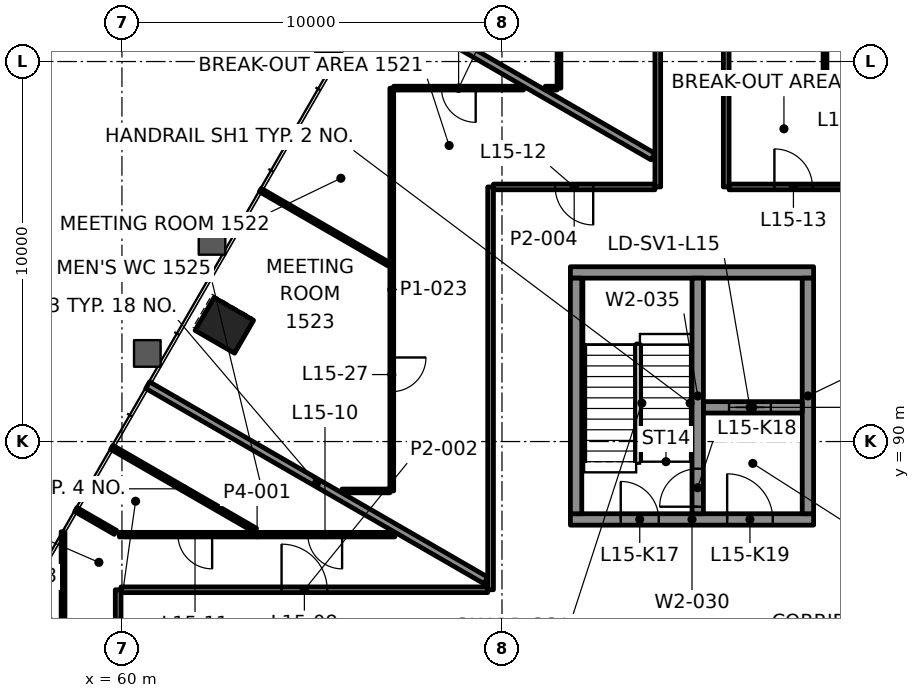
"""IFC4 building model, lengths in metres.
Left out: names, types, materials, properties, quantities, classifications, styles, units other than length and angle.
Written with IfcOpenShell. Run it as: python <this file> out.ifc"""

import sys

from ifc_helpers import new_model, si_unit, direction, frame, frame_2d, origin, origin_2d, place, context, subcontext, project, spatial, rectangle, extrude, element, fill, save


model = new_model("IFC4")
c1 = context("Model", 3, precision=1e-05, world=origin(), true_north=direction((0.0, 1.0)))
c2 = subcontext(c1, "Body", "Model", "MODEL_VIEW")
j1 = project(units=[si_unit("LENGTHUNIT", "METRE"), si_unit("PLANEANGLEUNIT", "RADIAN")], contexts=[c1])
p1 = place(None, origin())
s1 = spatial("IfcSite", under=j1, at=p1, CompositionType="ELEMENT")
p2 = place(p1, origin())
s2 = spatial("IfcBuilding", under=s1, at=p2, CompositionType="ELEMENT")
p3 = place(p2, frame((0.0, 0.0, 69.4)))
s3 = spatial("IfcBuildingStorey", under=s2, at=p3, CompositionType="ELEMENT", Elevation=69.4)
for number, where, z_axis, x_axis in (
    (1, (62.694, 93.057, -0.0), (0.0, 0.0, 1.0), (-0.5, -0.866, 0.0)),
    (2, (57.951, 84.843, -0.0), (0.0, 0.0, 1.0), (-0.5, -0.866, 0.0)),
):
    element("IfcColumn", number, at=place(p3, frame(where, z_axis=z_axis, x_axis=x_axis)), inside=s3, PredefinedType="COLUMN", context=c2, shape_type="SweptSolid", body=[
        extrude(rectangle(XDim=1.0, YDim=1.2, at=origin_2d()), origin(), (0.0, 0.0, 1.0), 4.2),
    ])
p4 = place(p3, frame((71.8, 87.95, 0.0), z_axis=(0.0, 0.0, 1.0), x_axis=(1.0, 0.0, 0.0)))
e3 = element("IfcWall", 3, at=p4, inside=s3, PredefinedType="SHEAR", context=c2, shape_type="SweptSolid", body=[
    extrude(rectangle(XDim=6.4, YDim=0.3, at=frame_2d((3.2, 0.0))), origin(), (0.0, 0.0, 1.0), 4.0),
])
p5 = place(p4, frame((1.325, 0.0, 0.0)))
e4 = element("IfcOpeningElement", 4, at=p5, cuts=e3, PredefinedType="OPENING", context=c2, shape_type="SweptSolid", body=[
    extrude(rectangle(XDim=1.0, YDim=2.1, at=frame_2d((0.5, 1.05))), frame((0.0, 0.16, 0.0), z_axis=(0.0, -1.0, 0.0), x_axis=(1.0, 0.0, 0.0)), (0.0, 0.0, 1.0), 0.32),
])
p6 = place(p4, frame((4.125, 0.0, 0.0)))
e5 = element("IfcOpeningElement", 5, at=p6, cuts=e3, PredefinedType="OPENING", context=c2, shape_type="SweptSolid", body=[
    extrude(rectangle(XDim=1.2, YDim=2.1, at=frame_2d((0.6, 1.05))), frame((0.0, 0.16, 0.0), z_axis=(0.0, -1.0, 0.0), x_axis=(1.0, 0.0, 0.0)), (0.0, 0.0, 1.0), 0.32),
])
p7 = place(p3, frame((71.8, 94.45, 0.0), z_axis=(0.0, 0.0, 1.0), x_axis=(1.0, 0.0, 0.0)))
e6 = element("IfcWall", 6, at=p7, inside=s3, PredefinedType="SHEAR", context=c2, shape_type="SweptSolid", body=[
    extrude(rectangle(XDim=6.4, YDim=0.3, at=frame_2d((3.2, 0.0))), origin(), (0.0, 0.0, 1.0), 4.0),
])
for number, where, z_axis, x_axis in (
    (7, (71.95, 88.1, 0.0), (0.0, 0.0, 1.0), (0.0, 1.0, 0.0)),
    (8, (78.05, 88.1, 0.0), (0.0, 0.0, 1.0), (0.0, 1.0, 0.0)),
):
    element("IfcWall", number, at=place(p3, frame(where, z_axis=z_axis, x_axis=x_axis)), inside=s3, PredefinedType="SHEAR", context=c2, shape_type="SweptSolid", body=[
        extrude(rectangle(XDim=6.2, YDim=0.3, at=frame_2d((3.1, 0.0))), origin(), (0.0, 0.0, 1.0), 4.0),
    ])
p8 = place(p3, frame((75.3, 90.9, 0.0), z_axis=(0.0, 0.0, 1.0), x_axis=(1.0, 0.0, 0.0)))
e9 = element("IfcWall", 9, at=p8, inside=s3, PredefinedType="SHEAR", context=c2, shape_type="SweptSolid", body=[
    extrude(rectangle(XDim=2.6, YDim=0.3, at=frame_2d((1.3, 0.0))), origin(), (0.0, 0.0, 1.0), 4.0),
])
p9 = place(p8, frame((0.675, 0.0, 0.0)))
e10 = element("IfcOpeningElement", 10, at=p9, cuts=e9, PredefinedType="OPENING", context=c2, shape_type="SweptSolid", body=[
    extrude(rectangle(XDim=1.1, YDim=2.1, at=frame_2d((0.55, 1.05))), frame((0.0, 0.16, 0.0), z_axis=(0.0, -1.0, 0.0), x_axis=(1.0, 0.0, 0.0)), (0.0, 0.0, 1.0), 0.32),
])
p10 = place(p3, frame((75.15, 88.1, 0.0), z_axis=(0.0, 0.0, 1.0), x_axis=(0.0, 1.0, 0.0)))
e11 = element("IfcWall", 11, at=p10, inside=s3, PredefinedType="SHEAR", context=c2, shape_type="SweptSolid", body=[
    extrude(rectangle(XDim=6.2, YDim=0.3, at=frame_2d((3.1, 0.0))), origin(), (0.0, 0.0, 1.0), 4.0),
])
p11 = place(p10, frame((0.185, 0.0, 0.0)))
e12 = element("IfcOpeningElement", 12, at=p11, cuts=e11, PredefinedType="OPENING", context=c2, shape_type="SweptSolid", body=[
    extrude(rectangle(XDim=1.0, YDim=2.1, at=frame_2d((0.5, 1.05))), frame((0.0, 0.16, 0.0), z_axis=(0.0, -1.0, 0.0), x_axis=(1.0, 0.0, 0.0)), (0.0, 0.0, 1.0), 0.32),
])
p12 = place(p3, frame((59.976, 86.1, 0.0), z_axis=(0.0, 0.0, 1.0), x_axis=(1.0, 0.0, 0.0)))
e13 = element("IfcWall", 13, at=p12, inside=s3, PredefinedType="PARTITIONING", context=c2, shape_type="SweptSolid", body=[
    extrude(rectangle(XDim=9.649, YDim=0.15, at=frame_2d((4.825, 0.0))), origin(), (0.0, 0.0, 1.0), 3.4),
])
p13 = place(p12, frame((4.225, 0.0, 0.0)))
e14 = element("IfcOpeningElement", 14, at=p13, cuts=e13, PredefinedType="OPENING", context=c2, shape_type="SweptSolid", body=[
    extrude(rectangle(XDim=1.2, YDim=2.1, at=frame_2d((0.6, 1.05))), frame((0.0, 0.085, 0.0), z_axis=(0.0, -1.0, 0.0), x_axis=(1.0, 0.0, 0.0)), (0.0, 0.0, 1.0), 0.17),
])
p14 = place(p3, frame((67.181, 87.55, 0.0), z_axis=(0.0, 0.0, 1.0), x_axis=(-1.0, 0.0, 0.0)))
e15 = element("IfcWall", 15, at=p14, inside=s3, PredefinedType="PARTITIONING", context=c2, shape_type="SweptSolid", body=[
    extrude(rectangle(XDim=7.249, YDim=0.12, at=frame_2d((3.625, 0.0))), origin(), (0.0, 0.0, 1.0), 3.4),
])
p15 = place(p14, frame((1.388, 0.0, 0.0)))
e16 = element("IfcOpeningElement", 16, at=p15, cuts=e15, PredefinedType="OPENING", context=c2, shape_type="SweptSolid", body=[
    extrude(rectangle(XDim=0.9, YDim=2.1, at=frame_2d((0.45, 1.05))), frame((0.0, 0.07, 0.0), z_axis=(0.0, -1.0, 0.0), x_axis=(1.0, 0.0, 0.0)), (0.0, 0.0, 1.0), 0.14),
])
p16 = place(p14, frame((4.807, 0.0, 0.0)))
e17 = element("IfcOpeningElement", 17, at=p16, cuts=e15, PredefinedType="OPENING", context=c2, shape_type="SweptSolid", body=[
    extrude(rectangle(XDim=0.9, YDim=2.1, at=frame_2d((0.45, 1.05))), frame((0.0, 0.07, 0.0), z_axis=(0.0, -1.0, 0.0), x_axis=(1.0, 0.0, 0.0)), (0.0, 0.0, 1.0), 0.14),
])
p17 = place(p3, frame((65.789, 88.7, 0.0), z_axis=(0.0, 0.0, 1.0), x_axis=(1.0, 0.0, 0.0)))
e18 = element("IfcWall", 18, at=p17, inside=s3, PredefinedType="PARTITIONING", context=c2, shape_type="SweptSolid", body=[
    extrude(rectangle(XDim=1.261, YDim=0.1, at=frame_2d((0.631, 0.0))), origin(), (0.0, 0.0, 1.0), 3.4),
])
p18 = place(p3, frame((74.025, 96.7, 0.0), z_axis=(0.0, 0.0, 1.0), x_axis=(-1.0, 0.0, 0.0)))
e19 = element("IfcWall", 19, at=p18, inside=s3, PredefinedType="PARTITIONING", context=c2, shape_type="SweptSolid", body=[
    extrude(rectangle(XDim=4.25, YDim=0.15, at=frame_2d((2.125, 0.0))), origin(), (0.0, 0.0, 1.0), 3.4),
])
p19 = place(p18, frame((1.625, 0.0, 0.0)))
e20 = element("IfcOpeningElement", 20, at=p19, cuts=e19, PredefinedType="OPENING", context=c2, shape_type="SweptSolid", body=[
    extrude(rectangle(XDim=1.0, YDim=2.1, at=frame_2d((0.5, 1.05))), frame((0.0, 0.085, 0.0), z_axis=(0.0, -1.0, 0.0), x_axis=(1.0, 0.0, 0.0)), (0.0, 0.0, 1.0), 0.17),
])
p20 = place(p3, frame((75.975, 96.7, 0.0), z_axis=(0.0, 0.0, 1.0), x_axis=(1.0, 0.0, 0.0)))
e21 = element("IfcWall", 21, at=p20, inside=s3, PredefinedType="PARTITIONING", context=c2, shape_type="SweptSolid", body=[
    extrude(rectangle(XDim=3.387, YDim=0.15, at=frame_2d((1.693, 0.0))), origin(), (0.0, 0.0, 1.0), 3.4),
])
p21 = place(p20, frame((1.194, 0.0, 0.0)))
e22 = element("IfcOpeningElement", 22, at=p21, cuts=e21, PredefinedType="OPENING", context=c2, shape_type="SweptSolid", body=[
    extrude(rectangle(XDim=1.0, YDim=2.1, at=frame_2d((0.5, 1.05))), frame((0.0, 0.085, 0.0), z_axis=(0.0, -1.0, 0.0), x_axis=(1.0, 0.0, 0.0)), (0.0, 0.0, 1.0), 0.17),
])
p22 = place(p3, frame((70.567, 99.3, 0.0), z_axis=(0.0, 0.0, 1.0), x_axis=(-1.0, 0.0, 0.0)))
e23 = element("IfcWall", 23, at=p22, inside=s3, PredefinedType="PARTITIONING", context=c2, shape_type="SweptSolid", body=[
    extrude(rectangle(XDim=3.417, YDim=0.1, at=frame_2d((1.708, 0.0))), origin(), (0.0, 0.0, 1.0), 3.4),
])
p23 = place(p22, frame((1.258, 0.0, 0.0)))
e24 = element("IfcOpeningElement", 24, at=p23, cuts=e23, PredefinedType="OPENING", context=c2, shape_type="SweptSolid", body=[
    extrude(rectangle(XDim=0.9, YDim=2.1, at=frame_2d((0.45, 1.05))), frame((0.0, 0.06, 0.0), z_axis=(0.0, -1.0, 0.0), x_axis=(1.0, 0.0, 0.0)), (0.0, 0.0, 1.0), 0.12),
])
p24 = place(p3, frame((78.55, 99.3, 0.0), z_axis=(0.0, 0.0, 1.0), x_axis=(1.0, 0.0, 0.0)))
e25 = element("IfcWall", 25, at=p24, inside=s3, PredefinedType="PARTITIONING", context=c2, shape_type="SweptSolid", body=[
    extrude(rectangle(XDim=4.349, YDim=0.1, at=frame_2d((2.175, 0.0))), origin(), (0.0, 0.0, 1.0), 3.4),
])
p25 = place(p24, frame((1.725, 0.0, 0.0)))
e26 = element("IfcOpeningElement", 26, at=p25, cuts=e25, PredefinedType="OPENING", context=c2, shape_type="SweptSolid", body=[
    extrude(rectangle(XDim=0.9, YDim=2.1, at=frame_2d((0.45, 1.05))), frame((0.0, 0.06, 0.0), z_axis=(0.0, -1.0, 0.0), x_axis=(1.0, 0.0, 0.0)), (0.0, 0.0, 1.0), 0.12),
])
p26 = place(p3, frame((78.5, 99.3, 0.0), z_axis=(0.0, 0.0, 1.0), x_axis=(0.0, 1.0, 0.0)))
e27 = element("IfcWall", 27, at=p26, inside=s3, PredefinedType="PARTITIONING", context=c2, shape_type="SweptSolid", body=[
    extrude(rectangle(XDim=9.736, YDim=0.1, at=frame_2d((4.868, 0.0))), origin(), (0.0, 0.0, 1.0), 3.4),
])
p27 = place(p26, frame((6.382, 0.0, 0.0)))
e28 = element("IfcOpeningElement", 28, at=p27, cuts=e27, PredefinedType="OPENING", context=c2, shape_type="SweptSolid", body=[
    extrude(rectangle(XDim=0.9, YDim=2.1, at=frame_2d((0.45, 1.05))), frame((0.0, 0.06, 0.0), z_axis=(0.0, -1.0, 0.0), x_axis=(1.0, 0.0, 0.0)), (0.0, 0.0, 1.0), 0.12),
])
p28 = place(p3, frame((75.9, 96.7, 0.0), z_axis=(0.0, 0.0, 1.0), x_axis=(0.0, 1.0, 0.0)))
e29 = element("IfcWall", 29, at=p28, inside=s3, PredefinedType="PARTITIONING", context=c2, shape_type="SweptSolid", body=[
    extrude(rectangle(XDim=9.737, YDim=0.15, at=frame_2d((4.868, 0.0))), origin(), (0.0, 0.0, 1.0), 3.4),
])
p29 = place(p3, frame((74.1, 96.7, 0.0), z_axis=(0.0, 0.0, 1.0), x_axis=(0.0, 1.0, 0.0)))
e30 = element("IfcWall", 30, at=p29, inside=s3, PredefinedType="PARTITIONING", context=c2, shape_type="SweptSolid", body=[
    extrude(rectangle(XDim=9.736, YDim=0.15, at=frame_2d((4.868, 0.0))), origin(), (0.0, 0.0, 1.0), 3.4),
])
p30 = place(p29, frame((4.629, 0.0, 0.0)))
e31 = element("IfcOpeningElement", 31, at=p30, cuts=e30, PredefinedType="OPENING", context=c2, shape_type="SweptSolid", body=[
    extrude(rectangle(XDim=1.0, YDim=2.1, at=frame_2d((0.5, 1.05))), frame((0.0, 0.085, 0.0), z_axis=(0.0, -1.0, 0.0), x_axis=(1.0, 0.0, 0.0)), (0.0, 0.0, 1.0), 0.17),
])
p31 = place(p3, frame((71.5, 104.801, 0.0), z_axis=(0.0, 0.0, 1.0), x_axis=(0.0, -1.0, 0.0)))
e32 = element("IfcWall", 32, at=p31, inside=s3, PredefinedType="PARTITIONING", context=c2, shape_type="SweptSolid", body=[
    extrude(rectangle(XDim=5.501, YDim=0.1, at=frame_2d((2.75, 0.0))), origin(), (0.0, 0.0, 1.0), 3.4),
])
p32 = place(p31, frame((2.301, 0.0, 0.0)))
e33 = element("IfcOpeningElement", 33, at=p32, cuts=e32, PredefinedType="OPENING", context=c2, shape_type="SweptSolid", body=[
    extrude(rectangle(XDim=0.9, YDim=2.1, at=frame_2d((0.45, 1.05))), frame((0.0, 0.06, 0.0), z_axis=(0.0, -1.0, 0.0), x_axis=(1.0, 0.0, 0.0)), (0.0, 0.0, 1.0), 0.12),
])
p33 = place(p3, frame((69.7, 86.1, 0.0), z_axis=(0.0, 0.0, 1.0), x_axis=(0.0, 1.0, 0.0)))
e34 = element("IfcWall", 34, at=p33, inside=s3, PredefinedType="PARTITIONING", context=c2, shape_type="SweptSolid", body=[
    extrude(rectangle(XDim=10.6, YDim=0.15, at=frame_2d((5.3, 0.0))), origin(), (0.0, 0.0, 1.0), 3.4),
])
p34 = place(p3, frame((67.1, 99.3, 0.0), z_axis=(0.0, 0.0, 1.0), x_axis=(0.0, -1.0, 0.0)))
e35 = element("IfcWall", 35, at=p34, inside=s3, PredefinedType="PARTITIONING", context=c2, shape_type="SweptSolid", body=[
    extrude(rectangle(XDim=10.6, YDim=0.1, at=frame_2d((5.3, 0.0))), origin(), (0.0, 0.0, 1.0), 3.4),
])
p35 = place(p34, frame((7.088, 0.0, 0.0)))
e36 = element("IfcOpeningElement", 36, at=p35, cuts=e35, PredefinedType="OPENING", context=c2, shape_type="SweptSolid", body=[
    extrude(rectangle(XDim=0.9, YDim=2.1, at=frame_2d((0.45, 1.05))), frame((0.0, 0.06, 0.0), z_axis=(0.0, -1.0, 0.0), x_axis=(1.0, 0.0, 0.0)), (0.0, 0.0, 1.0), 0.12),
])
p36 = place(p3, frame((59.9, 67.321, 0.0), z_axis=(0.0, 0.0, 1.0), x_axis=(0.0, 1.0, 0.0)))
e37 = element("IfcWall", 37, at=p36, inside=s3, PredefinedType="PARTITIONING", context=c2, shape_type="SweptSolid", body=[
    extrude(rectangle(XDim=18.778, YDim=0.15, at=frame_2d((9.389, 0.0))), origin(), (0.0, 0.0, 1.0), 3.4),
])
p37 = place(p3, frame((58.45, 85.133, 0.0), z_axis=(0.0, 0.0, 1.0), x_axis=(0.0, 1.0, 0.0)))
e38 = element("IfcWall", 38, at=p37, inside=s3, PredefinedType="PARTITIONING", context=c2, shape_type="SweptSolid", body=[
    extrude(rectangle(XDim=2.494, YDim=0.1, at=frame_2d((1.247, 0.0))), origin(), (0.0, 0.0, 1.0), 3.165),
])
p38 = place(p3, frame((73.973, 97.499, 0.0), z_axis=(0.0, 0.0, 1.0), x_axis=(-0.866037536751, 0.499978984496, 0.0)))
e39 = element("IfcWall", 39, at=p38, inside=s3, PredefinedType="PARTITIONING", context=c2, shape_type="SweptSolid", body=[
    extrude(rectangle(XDim=6.948, YDim=0.2, at=frame_2d((3.474, 0.0))), origin(), (0.0, 0.0, 1.0), 3.4),
])
p39 = place(p3, frame((67.024, 94.665, 0.0), z_axis=(0.0, 0.0, 1.0), x_axis=(-0.866046116492, 0.499964122822, 0.0)))
e40 = element("IfcWall", 40, at=p39, inside=s3, PredefinedType="PARTITIONING", context=c2, shape_type="SweptSolid", body=[
    extrude(rectangle(XDim=3.906, YDim=0.1, at=frame_2d((1.953, 0.0))), origin(), (0.0, 0.0, 1.0), 3.165),
])
p40 = place(p3, frame((69.573, 86.348, 0.0), z_axis=(0.0, 0.0, 1.0), x_axis=(-0.866024495625, 0.500001572974, 0.0)))
e41 = element("IfcWall", 41, at=p40, inside=s3, PredefinedType="PARTITIONING", context=c2, shape_type="SweptSolid", body=[
    extrude(rectangle(XDim=10.272, YDim=0.2, at=frame_2d((5.136, 0.0))), origin(), (0.0, 0.0, 1.0), 3.165),
])
p41 = place(p3, frame((63.512, 87.665, 0.0), z_axis=(0.0, 0.0, 1.0), x_axis=(-0.866014185868, 0.500019429497, 0.0)))
e42 = element("IfcWall", 42, at=p41, inside=s3, PredefinedType="PARTITIONING", context=c2, shape_type="SweptSolid", body=[
    extrude(rectangle(XDim=4.365, YDim=0.12, at=frame_2d((2.182, 0.0))), origin(), (0.0, 0.0, 1.0), 3.165),
])
p42 = place(p3, frame((59.828, 87.61, 0.0), z_axis=(0.0, 0.0, 1.0), x_axis=(-0.865996090227, 0.500050769134, 0.0)))
e43 = element("IfcWall", 43, at=p42, inside=s3, PredefinedType="PARTITIONING", context=c2, shape_type="SweptSolid", body=[
    extrude(rectangle(XDim=1.202, YDim=0.12, at=frame_2d((0.601, 0.0))), origin(), (0.0, 0.0, 1.0), 3.165),
])
p43 = place(p3, frame((71.14, 99.3, 0.0), z_axis=(0.0, 0.0, 1.0), x_axis=(1.0, 0.0, 0.0)))
e44 = element("IfcWall", 44, at=p43, inside=s3, PredefinedType="PARTITIONING", context=c2, shape_type="SweptSolid", body=[
    extrude(rectangle(XDim=0.31, YDim=0.1, at=frame_2d((0.155, 0.0))), origin(), (0.0, 0.0, 1.0), 3.4),
])
p44 = place(p13, origin())
e45 = element("IfcDoor", 45, at=p44, inside=s3, OperationType="DOUBLE_DOOR_SINGLE_SWING", PredefinedType="DOOR", context=c2, shape_type="SweptSolid", body=[
    extrude(rectangle(XDim=1.2, YDim=2.1, at=frame_2d((0.6, 1.05))), frame((0.0, 0.025, 0.0), z_axis=(0.0, -1.0, 0.0), x_axis=(1.0, 0.0, 0.0)), (0.0, 0.0, 1.0), 0.05),
])
fill(e14, e45)
p45 = place(p15, origin())
e46 = element("IfcDoor", 46, at=p45, inside=s3, OperationType="SINGLE_SWING_LEFT", PredefinedType="DOOR", context=c2, shape_type="SweptSolid", body=[
    extrude(rectangle(XDim=0.9, YDim=2.1, at=frame_2d((0.45, 1.05))), frame((0.0, 0.025, 0.0), z_axis=(0.0, -1.0, 0.0), x_axis=(1.0, 0.0, 0.0)), (0.0, 0.0, 1.0), 0.05),
])
fill(e16, e46)
p46 = place(p16, origin())
e47 = element("IfcDoor", 47, at=p46, inside=s3, OperationType="SINGLE_SWING_RIGHT", PredefinedType="DOOR", context=c2, shape_type="SweptSolid", body=[
    extrude(rectangle(XDim=0.9, YDim=2.1, at=frame_2d((0.45, 1.05))), frame((0.0, 0.025, 0.0), z_axis=(0.0, -1.0, 0.0), x_axis=(1.0, 0.0, 0.0)), (0.0, 0.0, 1.0), 0.05),
])
fill(e17, e47)
p47 = place(p19, origin())
e48 = element("IfcDoor", 48, at=p47, inside=s3, OperationType="SINGLE_SWING_LEFT", PredefinedType="DOOR", context=c2, shape_type="SweptSolid", body=[
    extrude(rectangle(XDim=1.0, YDim=2.1, at=frame_2d((0.5, 1.05))), frame((0.0, 0.025, 0.0), z_axis=(0.0, -1.0, 0.0), x_axis=(1.0, 0.0, 0.0)), (0.0, 0.0, 1.0), 0.05),
])
fill(e20, e48)
p48 = place(p21, origin())
e49 = element("IfcDoor", 49, at=p48, inside=s3, OperationType="SINGLE_SWING_LEFT", PredefinedType="DOOR", context=c2, shape_type="SweptSolid", body=[
    extrude(rectangle(XDim=1.0, YDim=2.1, at=frame_2d((0.5, 1.05))), frame((0.0, 0.025, 0.0), z_axis=(0.0, -1.0, 0.0), x_axis=(1.0, 0.0, 0.0)), (0.0, 0.0, 1.0), 0.05),
])
fill(e22, e49)
p49 = place(p23, origin())
e50 = element("IfcDoor", 50, at=p49, inside=s3, OperationType="SINGLE_SWING_RIGHT", PredefinedType="DOOR", context=c2, shape_type="SweptSolid", body=[
    extrude(rectangle(XDim=0.9, YDim=2.1, at=frame_2d((0.45, 1.05))), frame((0.0, 0.025, 0.0), z_axis=(0.0, -1.0, 0.0), x_axis=(1.0, 0.0, 0.0)), (0.0, 0.0, 1.0), 0.05),
])
fill(e24, e50)
p50 = place(p35, origin())
e51 = element("IfcDoor", 51, at=p50, inside=s3, OperationType="SINGLE_SWING_LEFT", PredefinedType="DOOR", context=c2, shape_type="SweptSolid", body=[
    extrude(rectangle(XDim=0.9, YDim=2.1, at=frame_2d((0.45, 1.05))), frame((0.0, 0.025, 0.0), z_axis=(0.0, -1.0, 0.0), x_axis=(1.0, 0.0, 0.0)), (0.0, 0.0, 1.0), 0.05),
])
fill(e36, e51)
p51 = place(p9, origin())
e52 = element("IfcDoor", 52, at=p51, inside=s3, OperationType="DOUBLE_DOOR_SLIDING", PredefinedType="DOOR", context=c2, shape_type="SweptSolid", body=[
    extrude(rectangle(XDim=1.1, YDim=2.1, at=frame_2d((0.55, 1.05))), frame((0.0, 0.025, 0.0), z_axis=(0.0, -1.0, 0.0), x_axis=(1.0, 0.0, 0.0)), (0.0, 0.0, 1.0), 0.05),
])
fill(e10, e52)
p52 = place(p5, origin())
e53 = element("IfcDoor", 53, at=p52, inside=s3, OperationType="SINGLE_SWING_RIGHT", PredefinedType="DOOR", context=c2, shape_type="SweptSolid", body=[
    extrude(rectangle(XDim=1.0, YDim=2.1, at=frame_2d((0.5, 1.05))), frame((0.0, 0.025, 0.0), z_axis=(0.0, -1.0, 0.0), x_axis=(1.0, 0.0, 0.0)), (0.0, 0.0, 1.0), 0.05),
])
fill(e4, e53)
p53 = place(p11, origin())
e54 = element("IfcDoor", 54, at=p53, inside=s3, OperationType="SINGLE_SWING_LEFT", PredefinedType="DOOR", context=c2, shape_type="SweptSolid", body=[
    extrude(rectangle(XDim=1.0, YDim=2.1, at=frame_2d((0.5, 1.05))), frame((0.0, 0.025, 0.0), z_axis=(0.0, -1.0, 0.0), x_axis=(1.0, 0.0, 0.0)), (0.0, 0.0, 1.0), 0.05),
])
fill(e12, e54)
p54 = place(p6, origin())
e55 = element("IfcDoor", 55, at=p54, inside=s3, OperationType="SINGLE_SWING_RIGHT", PredefinedType="DOOR", context=c2, shape_type="SweptSolid", body=[
    extrude(rectangle(XDim=1.2, YDim=2.1, at=frame_2d((0.6, 1.05))), frame((0.0, 0.025, 0.0), z_axis=(0.0, -1.0, 0.0), x_axis=(1.0, 0.0, 0.0)), (0.0, 0.0, 1.0), 0.05),
])
fill(e5, e55)
save(model, sys.argv[1])
